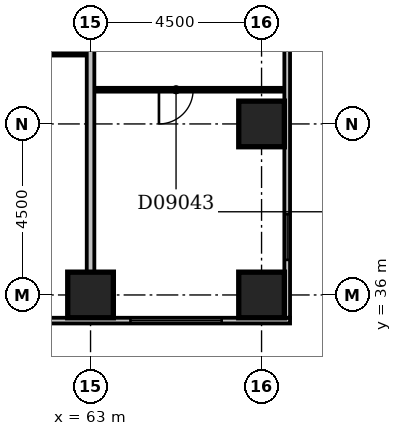
"""IFC4 building model, lengths in metres.
Left out: names, types, materials, properties, quantities, classifications, styles, units other than length and angle.
Written with IfcOpenShell. Run it as: python <this file> out.ifc"""

import sys

from ifc_helpers import new_model, si_unit, direction, frame, frame_2d, origin, origin_2d, place, context, subcontext, project, spatial, rectangle, extrude, element, fill, save


model = new_model("IFC4")
c1 = context("Model", 3, precision=1e-05, world=origin(), true_north=direction((0.0, 1.0)))
c2 = subcontext(c1, "Body", "Model", "MODEL_VIEW")
j1 = project(units=[si_unit("LENGTHUNIT", "METRE"), si_unit("PLANEANGLEUNIT", "RADIAN")], contexts=[c1])
p1 = place(None, origin())
s1 = spatial("IfcSite", under=j1, at=p1, CompositionType="ELEMENT")
p2 = place(p1, origin())
s2 = spatial("IfcBuilding", under=s1, at=p2, CompositionType="ELEMENT")
p3 = place(p2, frame((0.0, 0.0, 43.4)))
s3 = spatial("IfcBuildingStorey", under=s2, at=p3, CompositionType="ELEMENT", Elevation=43.4)
for number, where, z_axis, x_axis in (
    (1, (63.0, 36.0, -0.3), (0.0, 0.0, 1.0), (1.0, 0.0, 0.0)),
    (2, (67.5, 36.0, -0.3), (0.0, 0.0, 1.0), (1.0, 0.0, 0.0)),
    (3, (67.5, 40.5, -0.3), (0.0, 0.0, 1.0), (1.0, 0.0, 0.0)),
):
    element("IfcColumn", number, at=place(p3, frame(where, z_axis=z_axis, x_axis=x_axis)), inside=s3, PredefinedType="COLUMN", context=c2, shape_type="SweptSolid", body=[
        extrude(rectangle(XDim=1.2, YDim=1.2, at=origin_2d()), origin(), (0.0, 0.0, 1.0), 3.6),
    ])
p4 = place(p3, frame((23.1, 35.325, 0.0), z_axis=(0.0, 0.0, 1.0), x_axis=(1.0, 0.0, 0.0)))
e4 = element("IfcWall", 4, at=p4, inside=s3, PredefinedType="STANDARD", context=c2, shape_type="SweptSolid", body=[
    extrude(rectangle(XDim=45.15, YDim=0.15, at=frame_2d((22.575, 0.0))), origin(), (0.0, 0.0, 1.0), 2.7),
])
p5 = place(p4, frame((0.303, 0.0, 0.6)))
e5 = element("IfcOpeningElement", 5, at=p5, cuts=e4, PredefinedType="OPENING", context=c2, shape_type="SweptSolid", body=[
    extrude(rectangle(XDim=2.1, YDim=1.8, at=frame_2d((1.05, 0.9))), frame((0.0, 0.087, 0.0), z_axis=(0.0, -1.0, 0.0), x_axis=(1.0, 0.0, 0.0)), (0.0, 0.0, 1.0), 0.174),
])
p6 = place(p4, frame((4.95, 0.0, 0.6)))
e6 = element("IfcOpeningElement", 6, at=p6, cuts=e4, PredefinedType="OPENING", context=c2, shape_type="SweptSolid", body=[
    extrude(rectangle(XDim=2.4, YDim=1.8, at=frame_2d((1.2, 0.9))), frame((0.0, 0.087, 0.0), z_axis=(0.0, -1.0, 0.0), x_axis=(1.0, 0.0, 0.0)), (0.0, 0.0, 1.0), 0.174),
])
p7 = place(p4, frame((9.45, 0.0, 0.6)))
e7 = element("IfcOpeningElement", 7, at=p7, cuts=e4, PredefinedType="OPENING", context=c2, shape_type="SweptSolid", body=[
    extrude(rectangle(XDim=2.4, YDim=1.8, at=frame_2d((1.2, 0.9))), frame((0.0, 0.087, 0.0), z_axis=(0.0, -1.0, 0.0), x_axis=(1.0, 0.0, 0.0)), (0.0, 0.0, 1.0), 0.174),
])
p8 = place(p4, frame((13.95, 0.0, 0.6)))
e8 = element("IfcOpeningElement", 8, at=p8, cuts=e4, PredefinedType="OPENING", context=c2, shape_type="SweptSolid", body=[
    extrude(rectangle(XDim=2.4, YDim=1.8, at=frame_2d((1.2, 0.9))), frame((0.0, 0.087, 0.0), z_axis=(0.0, -1.0, 0.0), x_axis=(1.0, 0.0, 0.0)), (0.0, 0.0, 1.0), 0.174),
])
p9 = place(p4, frame((18.45, 0.0, 0.6)))
e9 = element("IfcOpeningElement", 9, at=p9, cuts=e4, PredefinedType="OPENING", context=c2, shape_type="SweptSolid", body=[
    extrude(rectangle(XDim=2.4, YDim=1.8, at=frame_2d((1.2, 0.9))), frame((0.0, 0.087, 0.0), z_axis=(0.0, -1.0, 0.0), x_axis=(1.0, 0.0, 0.0)), (0.0, 0.0, 1.0), 0.174),
])
p10 = place(p4, frame((24.277, 0.0, 0.6)))
e10 = element("IfcOpeningElement", 10, at=p10, cuts=e4, PredefinedType="OPENING", context=c2, shape_type="SweptSolid", body=[
    extrude(rectangle(XDim=1.2, YDim=1.8, at=frame_2d((0.6, 0.9))), frame((0.0, 0.087, 0.0), z_axis=(0.0, -1.0, 0.0), x_axis=(1.0, 0.0, 0.0)), (0.0, 0.0, 1.0), 0.174),
])
p11 = place(p4, frame((27.297, 0.0, 0.6)))
e11 = element("IfcOpeningElement", 11, at=p11, cuts=e4, PredefinedType="OPENING", context=c2, shape_type="SweptSolid", body=[
    extrude(rectangle(XDim=2.1, YDim=1.8, at=frame_2d((1.05, 0.9))), frame((0.0, 0.087, 0.0), z_axis=(0.0, -1.0, 0.0), x_axis=(1.0, 0.0, 0.0)), (0.0, 0.0, 1.0), 0.174),
])
p12 = place(p4, frame((31.95, 0.0, 0.6)))
e12 = element("IfcOpeningElement", 12, at=p12, cuts=e4, PredefinedType="OPENING", context=c2, shape_type="SweptSolid", body=[
    extrude(rectangle(XDim=2.4, YDim=1.8, at=frame_2d((1.2, 0.9))), frame((0.0, 0.087, 0.0), z_axis=(0.0, -1.0, 0.0), x_axis=(1.0, 0.0, 0.0)), (0.0, 0.0, 1.0), 0.174),
])
p13 = place(p4, frame((36.45, 0.0, 0.6)))
e13 = element("IfcOpeningElement", 13, at=p13, cuts=e4, PredefinedType="OPENING", context=c2, shape_type="SweptSolid", body=[
    extrude(rectangle(XDim=2.4, YDim=1.8, at=frame_2d((1.2, 0.9))), frame((0.0, 0.087, 0.0), z_axis=(0.0, -1.0, 0.0), x_axis=(1.0, 0.0, 0.0)), (0.0, 0.0, 1.0), 0.174),
])
p14 = place(p4, frame((40.95, 0.0, 0.6)))
e14 = element("IfcOpeningElement", 14, at=p14, cuts=e4, PredefinedType="OPENING", context=c2, shape_type="SweptSolid", body=[
    extrude(rectangle(XDim=2.4, YDim=1.8, at=frame_2d((1.2, 0.9))), frame((0.0, 0.087, 0.0), z_axis=(0.0, -1.0, 0.0), x_axis=(1.0, 0.0, 0.0)), (0.0, 0.0, 1.0), 0.174),
])
p15 = place(p3, frame((68.175, 35.4, 0.0), z_axis=(0.0, 0.0, 1.0), x_axis=(0.0, 1.0, 0.0)))
e15 = element("IfcWall", 15, at=p15, inside=s3, PredefinedType="STANDARD", context=c2, shape_type="SweptSolid", body=[
    extrude(rectangle(XDim=23.85, YDim=0.15, at=frame_2d((11.925, 0.0))), origin(), (0.0, 0.0, 1.0), 2.7),
])
p16 = place(p15, frame((1.523, 0.0, 0.6)))
e16 = element("IfcOpeningElement", 16, at=p16, cuts=e15, PredefinedType="OPENING", context=c2, shape_type="SweptSolid", body=[
    extrude(rectangle(XDim=1.2, YDim=1.8, at=frame_2d((0.6, 0.9))), frame((0.0, 0.087, 0.0), z_axis=(0.0, -1.0, 0.0), x_axis=(1.0, 0.0, 0.0)), (0.0, 0.0, 1.0), 0.174),
])
p17 = place(p15, frame((19.5, 0.0, 0.6)))
e17 = element("IfcOpeningElement", 17, at=p17, cuts=e15, PredefinedType="OPENING", context=c2, shape_type="SweptSolid", body=[
    extrude(rectangle(XDim=0.6, YDim=1.8, at=frame_2d((0.3, 0.9))), frame((0.0, 0.087, 0.0), z_axis=(0.0, -1.0, 0.0), x_axis=(1.0, 0.0, 0.0)), (0.0, 0.0, 1.0), 0.174),
])
p18 = place(p15, frame((21.78, 0.0, 0.6)))
e18 = element("IfcOpeningElement", 18, at=p18, cuts=e15, PredefinedType="OPENING", context=c2, shape_type="SweptSolid", body=[
    extrude(rectangle(XDim=0.45, YDim=1.8, at=frame_2d((0.225, 0.9))), frame((0.0, 0.087, 0.0), z_axis=(0.0, -1.0, 0.0), x_axis=(1.0, 0.0, 0.0)), (0.0, 0.0, 1.0), 0.174),
])
p19 = place(p3, frame((63.0, 36.6, 0.0), z_axis=(0.0, 0.0, 1.0), x_axis=(0.0, 1.0, 0.0)))
e19 = element("IfcWall", 19, at=p19, inside=s3, PredefinedType="PARTITIONING", context=c2, shape_type="SweptSolid", body=[
    extrude(rectangle(XDim=12.8, YDim=0.2, at=frame_2d((6.4, 0.0))), origin(), (0.0, 0.0, 1.0), 2.4),
])
p20 = place(p3, frame((63.1, 41.4, 0.0), z_axis=(0.0, 0.0, 1.0), x_axis=(1.0, 0.0, 0.0)))
e20 = element("IfcWall", 20, at=p20, inside=s3, PredefinedType="PARTITIONING", context=c2, shape_type="SweptSolid", body=[
    extrude(rectangle(XDim=5.0, YDim=0.1, at=frame_2d((2.5, 0.0))), origin(), (0.0, 0.0, 1.0), 3.3),
])
p21 = place(p20, frame((1.7, 0.0, 0.0)))
e21 = element("IfcOpeningElement", 21, at=p21, cuts=e20, PredefinedType="OPENING", context=c2, shape_type="SweptSolid", body=[
    extrude(rectangle(XDim=0.9, YDim=2.1, at=frame_2d((0.45, 1.05))), frame((0.0, 0.062, 0.0), z_axis=(0.0, -1.0, 0.0), x_axis=(1.0, 0.0, 0.0)), (0.0, 0.0, 1.0), 0.124),
])
p22 = place(p3, frame((45.1, 42.35, 0.0), z_axis=(0.0, 0.0, 1.0), x_axis=(1.0, 0.0, 0.0)))
e22 = element("IfcWall", 22, at=p22, inside=s3, PredefinedType="PARTITIONING", context=c2, shape_type="SweptSolid", body=[
    extrude(rectangle(XDim=17.8, YDim=0.1, at=frame_2d((8.9, 0.0))), origin(), (0.0, 0.0, 1.0), 3.3),
])
p23 = place(p22, frame((1.7, 0.0, 0.0)))
e23 = element("IfcOpeningElement", 23, at=p23, cuts=e22, PredefinedType="OPENING", context=c2, shape_type="SweptSolid", body=[
    extrude(rectangle(XDim=0.9, YDim=2.1, at=frame_2d((0.45, 1.05))), frame((0.0, 0.062, 0.0), z_axis=(0.0, -1.0, 0.0), x_axis=(1.0, 0.0, 0.0)), (0.0, 0.0, 1.0), 0.124),
])
p24 = place(p22, frame((6.2, 0.0, 0.0)))
e24 = element("IfcOpeningElement", 24, at=p24, cuts=e22, PredefinedType="OPENING", context=c2, shape_type="SweptSolid", body=[
    extrude(rectangle(XDim=0.9, YDim=2.1, at=frame_2d((0.45, 1.05))), frame((0.0, 0.062, 0.0), z_axis=(0.0, -1.0, 0.0), x_axis=(1.0, 0.0, 0.0)), (0.0, 0.0, 1.0), 0.124),
])
p25 = place(p22, frame((10.7, 0.0, 0.0)))
e25 = element("IfcOpeningElement", 25, at=p25, cuts=e22, PredefinedType="OPENING", context=c2, shape_type="SweptSolid", body=[
    extrude(rectangle(XDim=0.9, YDim=2.1, at=frame_2d((0.45, 1.05))), frame((0.0, 0.062, 0.0), z_axis=(0.0, -1.0, 0.0), x_axis=(1.0, 0.0, 0.0)), (0.0, 0.0, 1.0), 0.124),
])
p26 = place(p22, frame((15.2, 0.0, 0.0)))
e26 = element("IfcOpeningElement", 26, at=p26, cuts=e22, PredefinedType="OPENING", context=c2, shape_type="SweptSolid", body=[
    extrude(rectangle(XDim=0.9, YDim=2.1, at=frame_2d((0.45, 1.05))), frame((0.0, 0.062, 0.0), z_axis=(0.0, -1.0, 0.0), x_axis=(1.0, 0.0, 0.0)), (0.0, 0.0, 1.0), 0.124),
])
p27 = place(p14, origin())
e27 = element("IfcWindow", 27, at=p27, inside=s3, PartitioningType="SINGLE_PANEL", PredefinedType="WINDOW", context=c2, shape_type="SweptSolid", body=[
    extrude(rectangle(XDim=2.4, YDim=1.8, at=frame_2d((1.2, 0.9))), frame((0.0, 0.03, 0.0), z_axis=(0.0, -1.0, 0.0), x_axis=(1.0, 0.0, 0.0)), (0.0, 0.0, 1.0), 0.06),
])
fill(e14, e27)
p28 = place(p16, origin())
e28 = element("IfcWindow", 28, at=p28, inside=s3, PartitioningType="SINGLE_PANEL", PredefinedType="WINDOW", context=c2, shape_type="SweptSolid", body=[
    extrude(rectangle(XDim=1.2, YDim=1.8, at=frame_2d((0.6, 0.9))), frame((0.0, 0.03, 0.0), z_axis=(0.0, -1.0, 0.0), x_axis=(1.0, 0.0, 0.0)), (0.0, 0.0, 1.0), 0.06),
])
fill(e16, e28)
p29 = place(p21, frame((0.9, 0.0, 0.0), z_axis=(0.0, 0.0, 1.0), x_axis=(-1.0, 0.0, 0.0)))
e29 = element("IfcDoor", 29, at=p29, inside=s3, OperationType="SINGLE_SWING_RIGHT", PredefinedType="DOOR", context=c2, shape_type="SweptSolid", body=[
    extrude(rectangle(XDim=0.9, YDim=2.1, at=frame_2d((0.45, 1.05))), frame((0.0, 0.025, 0.0), z_axis=(0.0, -1.0, 0.0), x_axis=(1.0, 0.0, 0.0)), (0.0, 0.0, 1.0), 0.05),
])
fill(e21, e29)
save(model, sys.argv[1])
